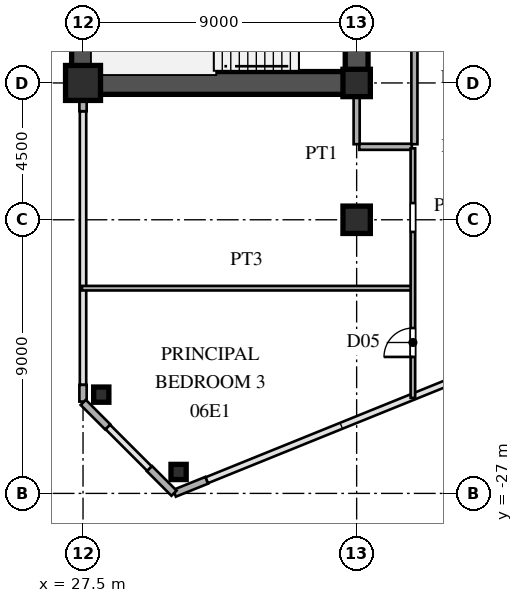
"""IFC4 building model, lengths in metres.
Left out: names, types, materials, properties, quantities, classifications, styles, units other than length and angle.
Written with IfcOpenShell. Run it as: python <this file> out.ifc"""

import sys

from ifc_helpers import new_model, si_unit, direction, frame, frame_2d, origin, origin_2d, place, context, subcontext, project, spatial, rectangle, hollow_rectangle, i_section, extrude, source, transform, mapped, element, fill, save


model = new_model("IFC4")
c1 = context("Model", 3, precision=1e-05, world=origin(), true_north=direction((0.0, 1.0)))
c2 = subcontext(c1, "Body", "Model", "MODEL_VIEW")
j1 = project(units=[si_unit("LENGTHUNIT", "METRE"), si_unit("PLANEANGLEUNIT", "RADIAN")], contexts=[c1])
p1 = place(None, origin())
s1 = spatial("IfcSite", under=j1, at=p1, CompositionType="ELEMENT")
p2 = place(p1, origin())
s2 = spatial("IfcBuilding", under=s1, at=p2, CompositionType="ELEMENT")
p3 = place(p2, frame((0.0, 0.0, 26.1)))
s3 = spatial("IfcBuildingStorey", under=s2, at=p3, CompositionType="ELEMENT", Elevation=26.1)
m1 = source(origin(), c2, "Body", "SweptSolid", [
    extrude(hollow_rectangle(XDim=1.15, YDim=1.15, WallThickness=0.048, at=origin_2d()), origin(), (0.0, 0.0, 1.0), 3.6),
])
p4 = place(p3, frame((27.5, -13.5, 0.0), z_axis=(0.0, 0.0, 1.0), x_axis=(1.0, 0.0, 0.0)))
e1 = element("IfcColumn", 1, at=p4, inside=s3, PredefinedType="COLUMN", context=c2, shape_type="MappedRepresentation", body=[
    mapped(m1, transform((0.0, 0.0, 0.0), scale=1.0)),
])
m2 = source(origin(), c2, "Body", "SweptSolid", [
    extrude(i_section(OverallWidth=0.9, OverallDepth=0.9, WebThickness=0.036, FlangeThickness=0.055, at=origin_2d()), origin(), (0.0, 0.0, 1.0), 3.6),
])
for number, where, z_axis, x_axis in (
    (2, (36.5, -18.0, 0.0), (0.0, 0.0, 1.0), (1.0, 0.0, 0.0)),
    (3, (36.5, -13.5, 0.0), (0.0, 0.0, 1.0), (1.0, 0.0, 0.0)),
):
    element("IfcColumn", number, at=place(p3, frame(where, z_axis=z_axis, x_axis=x_axis)), inside=s3, PredefinedType="COLUMN", context=c2, shape_type="MappedRepresentation", body=[
        mapped(m2, transform((0.0, 0.0, 0.0), scale=1.0)),
    ])
m3 = source(origin(), c2, "Body", "SweptSolid", [
    extrude(hollow_rectangle(XDim=0.5, YDim=0.5, WallThickness=0.02, at=origin_2d()), origin(), (0.0, 0.0, 1.0), 3.6),
])
for number, where, z_axis, x_axis in (
    (4, (30.643, -26.295, 0.0), (0.0, 0.0, 1.0), (1.0, 0.0, 0.0)),
    (5, (28.1, -23.751, 0.0), (0.0, 0.0, 1.0), (1.0, 0.0, 0.0)),
):
    element("IfcColumn", number, at=place(p3, frame(where, z_axis=z_axis, x_axis=x_axis)), inside=s3, PredefinedType="COLUMN", context=c2, shape_type="MappedRepresentation", body=[
        mapped(m3, transform((0.0, 0.0, 0.0), scale=1.0)),
    ])
p5 = place(p3, frame((30.509, -26.996, 0.0), z_axis=(0.0, 0.0, 1.0), x_axis=(0.927007103665, 0.375043770452, 0.0)))
e6 = element("IfcWall", 6, at=p5, inside=s3, PredefinedType="SOLIDWALL", context=c2, shape_type="SweptSolid", body=[
    extrude(rectangle(XDim=1.14, YDim=0.24, at=frame_2d((0.57, 0.0))), origin(), (0.0, 0.0, 1.0), 3.38),
])
p6 = place(p3, frame((27.5, -23.98, 0.0), z_axis=(0.0, 0.0, 1.0), x_axis=(0.0, 1.0, 0.0)))
e7 = element("IfcWall", 7, at=p6, inside=s3, PredefinedType="SOLIDWALL", context=c2, shape_type="SweptSolid", body=[
    extrude(rectangle(XDim=0.55, YDim=0.24, at=frame_2d((0.275, 0.0))), origin(), (0.0, 0.0, 1.0), 3.38),
])
p7 = place(p3, frame((27.5, -14.43, 0.0), z_axis=(0.0, 0.0, 1.0), x_axis=(0.0, 1.0, 0.0)))
e8 = element("IfcWall", 8, at=p7, inside=s3, PredefinedType="SOLIDWALL", context=c2, shape_type="SweptSolid", body=[
    extrude(rectangle(XDim=0.55, YDim=0.24, at=frame_2d((0.275, 0.0))), origin(), (0.0, 0.0, 1.0), 2.88),
])
for number, where, z_axis, x_axis in (
    (9, (27.507, -24.007, 0.0), (0.0, 0.0, 1.0), (0.707, -0.707, 0.0)),
    (10, (29.687, -26.187, 0.0), (0.0, 0.0, 1.0), (0.707, -0.707, 0.0)),
):
    element("IfcWall", number, at=place(p3, frame(where, z_axis=z_axis, x_axis=x_axis)), inside=s3, PredefinedType="SOLIDWALL", context=c2, shape_type="SweptSolid", body=[
        extrude(rectangle(XDim=1.14, YDim=0.24, at=frame_2d((0.57, 0.0))), origin(), (0.0, 0.0, 1.0), 3.38),
    ])
p8 = place(p3, frame((27.5, -13.5, 0.0), z_axis=(0.0, 0.0, 1.0), x_axis=(0.0, 1.0, 0.0)))
e11 = element("IfcWall", 11, at=p8, inside=s3, PredefinedType="SHEAR", context=c2, shape_type="SweptSolid", body=[
    extrude(rectangle(XDim=12.2, YDim=0.75, at=frame_2d((6.1, 0.0))), origin(), (0.0, 0.0, 1.0), 3.38),
])
p9 = place(p3, frame((27.5, -13.5, 0.0), z_axis=(0.0, 0.0, 1.0), x_axis=(1.0, 0.0, 0.0)))
e12 = element("IfcWall", 12, at=p9, inside=s3, PredefinedType="SHEAR", context=c2, shape_type="SweptSolid", body=[
    extrude(rectangle(XDim=9.0, YDim=0.75, at=frame_2d((4.5, 0.0))), origin(), (0.0, 0.0, 1.0), 3.38),
])
p10 = place(p3, frame((36.5, -13.65, 0.0), z_axis=(0.0, 0.0, 1.0), x_axis=(0.0, 1.0, 0.0)))
e13 = element("IfcWall", 13, at=p10, inside=s3, PredefinedType="SHEAR", context=c2, shape_type="SweptSolid", body=[
    extrude(rectangle(XDim=7.15, YDim=0.75, at=frame_2d((3.575, 0.0))), origin(), (0.0, 0.0, 1.0), 3.38),
])
p11 = place(p10, frame((4.675, 0.0, 0.0)))
e14 = element("IfcOpeningElement", 14, at=p11, cuts=e13, PredefinedType="OPENING", context=c2, shape_type="SweptSolid", body=[
    extrude(rectangle(XDim=1.15, YDim=2.2, at=frame_2d((0.575, 1.1))), frame((0.0, 0.385, 0.0), z_axis=(0.0, -1.0, 0.0), x_axis=(1.0, 0.0, 0.0)), (0.0, 0.0, 1.0), 0.77),
])
p12 = place(p3, frame((27.465, -20.25, 0.0), z_axis=(0.0, 0.0, 1.0), x_axis=(1.0, 0.0, 0.0)))
e15 = element("IfcWall", 15, at=p12, inside=s3, PredefinedType="PARTITIONING", context=c2, shape_type="SweptSolid", body=[
    extrude(rectangle(XDim=10.835, YDim=0.15, at=frame_2d((5.417, 0.0))), origin(), (0.0, 0.0, 1.0), 3.38),
])
p13 = place(p3, frame((36.585, -15.6, 0.0), z_axis=(0.0, 0.0, 1.0), x_axis=(1.0, 0.0, 0.0)))
e16 = element("IfcWall", 16, at=p13, inside=s3, PredefinedType="PARTITIONING", context=c2, shape_type="SweptSolid", body=[
    extrude(rectangle(XDim=1.73, YDim=0.2, at=frame_2d((0.865, 0.0))), origin(), (0.0, 0.0, 1.0), 3.38),
])
p14 = place(p3, frame((36.5, -15.515, 0.0), z_axis=(0.0, 0.0, 1.0), x_axis=(0.0, 1.0, 0.0)))
e17 = element("IfcWall", 17, at=p14, inside=s3, PredefinedType="PARTITIONING", context=c2, shape_type="SweptSolid", body=[
    extrude(rectangle(XDim=1.635, YDim=0.2, at=frame_2d((0.817, 0.0))), origin(), (0.0, 0.0, 1.0), 2.68),
])
p15 = place(p3, frame((38.35, -23.858, 0.0), z_axis=(0.0, 0.0, 1.0), x_axis=(0.0, 1.0, 0.0)))
e18 = element("IfcWall", 18, at=p15, inside=s3, PredefinedType="PARTITIONING", context=c2, shape_type="SweptSolid", body=[
    extrude(rectangle(XDim=8.208, YDim=0.15, at=frame_2d((4.104, 0.0))), origin(), (0.0, 0.0, 1.0), 3.38),
])
p16 = place(p15, frame((1.347, 0.0, 0.0)))
e19 = element("IfcOpeningElement", 19, at=p16, cuts=e18, PredefinedType="OPENING", context=c2, shape_type="SweptSolid", body=[
    extrude(rectangle(XDim=0.95, YDim=2.15, at=frame_2d((0.475, 1.075))), frame((0.0, 0.085, 0.0), z_axis=(0.0, -1.0, 0.0), x_axis=(1.0, 0.0, 0.0)), (0.0, 0.0, 1.0), 0.17),
])
p17 = place(p15, frame((5.458, 0.0, 0.0)))
e20 = element("IfcOpeningElement", 20, at=p17, cuts=e18, PredefinedType="OPENING", context=c2, shape_type="SweptSolid", body=[
    extrude(rectangle(XDim=0.95, YDim=2.15, at=frame_2d((0.475, 1.075))), frame((0.0, 0.085, 0.0), z_axis=(0.0, -1.0, 0.0), x_axis=(1.0, 0.0, 0.0)), (0.0, 0.0, 1.0), 0.17),
])
p18 = place(p3, frame((38.4, -15.515, 0.0), z_axis=(0.0, 0.0, 1.0), x_axis=(0.0, 1.0, 0.0)))
e21 = element("IfcWall", 21, at=p18, inside=s3, PredefinedType="PARTITIONING", context=c2, shape_type="SweptSolid", body=[
    extrude(rectangle(XDim=31.03, YDim=0.2, at=frame_2d((15.515, 0.0))), origin(), (0.0, 0.0, 1.0), 3.38),
])
p19 = place(p18, frame((4.163, 0.0, 0.0)))
e22 = element("IfcOpeningElement", 22, at=p19, cuts=e21, PredefinedType="OPENING", context=c2, shape_type="SweptSolid", body=[
    extrude(rectangle(XDim=1.05, YDim=2.25, at=frame_2d((0.525, 1.125))), frame((0.0, 0.11, 0.0), z_axis=(0.0, -1.0, 0.0), x_axis=(1.0, 0.0, 0.0)), (0.0, 0.0, 1.0), 0.22),
])
p20 = place(p18, frame((15.538, 0.0, 0.0)))
e23 = element("IfcOpeningElement", 23, at=p20, cuts=e21, PredefinedType="OPENING", context=c2, shape_type="SweptSolid", body=[
    extrude(rectangle(XDim=1.05, YDim=2.25, at=frame_2d((0.525, 1.125))), frame((0.0, 0.11, 0.0), z_axis=(0.0, -1.0, 0.0), x_axis=(1.0, 0.0, 0.0)), (0.0, 0.0, 1.0), 0.22),
])
p21 = place(p18, frame((26.635, 0.0, 0.0)))
e24 = element("IfcOpeningElement", 24, at=p21, cuts=e21, PredefinedType="OPENING", context=c2, shape_type="SweptSolid", body=[
    extrude(rectangle(XDim=1.05, YDim=2.25, at=frame_2d((0.525, 1.125))), frame((0.0, 0.11, 0.0), z_axis=(0.0, -1.0, 0.0), x_axis=(1.0, 0.0, 0.0)), (0.0, 0.0, 1.0), 0.22),
])
m4 = source(origin(), c2, "Body", "SweptSolid", [
    extrude(rectangle(XDim=0.95, YDim=2.15, at=frame_2d((0.475, 1.075))), frame((0.0, 0.025, 0.0), z_axis=(0.0, -1.0, 0.0), x_axis=(1.0, 0.0, 0.0)), (0.0, 0.0, 1.0), 0.05),
])
p22 = place(p16, origin())
e25 = element("IfcDoor", 25, at=p22, inside=s3, OperationType="SINGLE_SWING_LEFT", PredefinedType="DOOR", context=c2, shape_type="MappedRepresentation", body=[
    mapped(m4, transform((0.0, 0.0, 0.0), scale=1.0)),
])
fill(e19, e25)
save(model, sys.argv[1])
